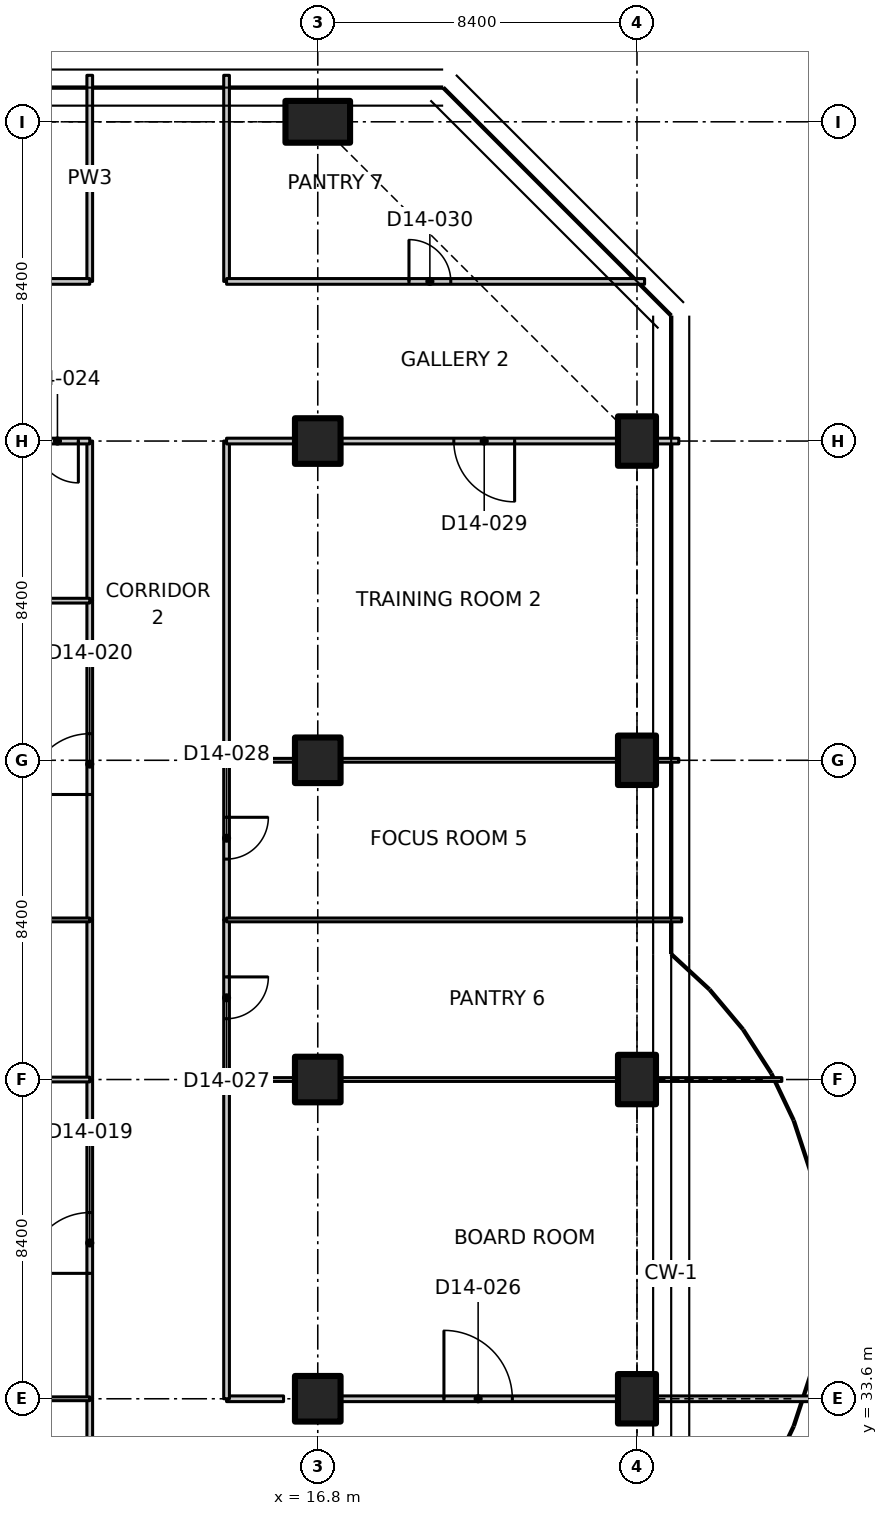
"""IFC4 building model, lengths in metres.
Left out: names, types, materials, properties, quantities, classifications, styles, units other than length and angle.
Written with IfcOpenShell. Run it as: python <this file> out.ifc"""

import sys

from ifc_helpers import new_model, si_unit, direction, frame, frame_2d, origin, origin_2d, place, context, subcontext, project, spatial, polyline, rectangle, outline, extrude, element, fill, save


model = new_model("IFC4")
c1 = context("Model", 3, precision=1e-05, world=origin(), true_north=direction((0.0, 1.0)))
c2 = subcontext(c1, "Body", "Model", "MODEL_VIEW")
j1 = project(units=[si_unit("LENGTHUNIT", "METRE"), si_unit("PLANEANGLEUNIT", "RADIAN")], contexts=[c1])
p1 = place(None, origin())
s1 = spatial("IfcSite", under=j1, at=p1, CompositionType="ELEMENT")
p2 = place(p1, origin())
s2 = spatial("IfcBuilding", under=s1, at=p2, CompositionType="ELEMENT")
p3 = place(p2, frame((0.0, 0.0, 102.5)))
s3 = spatial("IfcBuildingStorey", under=s2, at=p3, CompositionType="ELEMENT", Elevation=102.5)
for number, where, z_axis, x_axis in (
    (1, (16.8, 33.6, 0.0), (0.0, 0.0, 1.0), (1.0, 0.0, 0.0)),
    (2, (16.8, 42.0, 0.0), (0.0, 0.0, 1.0), (1.0, 0.0, 0.0)),
    (3, (16.8, 50.4, 0.0), (0.0, 0.0, 1.0), (1.0, 0.0, 0.0)),
    (4, (16.8, 58.8, 0.0), (0.0, 0.0, 1.0), (1.0, 0.0, 0.0)),
):
    element("IfcColumn", number, at=place(p3, frame(where, z_axis=z_axis, x_axis=x_axis)), inside=s3, PredefinedType="COLUMN", context=c2, shape_type="SweptSolid", body=[
        extrude(rectangle(XDim=1.2, YDim=1.2, at=origin_2d()), origin(), (0.0, 0.0, 1.0), 3.35),
    ])
p4 = place(p3, frame((16.8, 67.2, 0.0), z_axis=(0.0, 0.0, 1.0), x_axis=(0.0, 1.0, 0.0)))
e5 = element("IfcColumn", 5, at=p4, inside=s3, PredefinedType="COLUMN", context=c2, shape_type="SweptSolid", body=[
    extrude(rectangle(XDim=1.1, YDim=1.7, at=origin_2d()), origin(), (0.0, 0.0, 1.0), 3.35),
])
for number, where, z_axis, x_axis in (
    (6, (25.2, 33.6, 0.0), (0.0, 0.0, 1.0), (1.0, 0.0, 0.0)),
    (7, (25.2, 42.0, 0.0), (0.0, 0.0, 1.0), (1.0, 0.0, 0.0)),
    (8, (25.2, 50.4, 0.0), (0.0, 0.0, 1.0), (1.0, 0.0, 0.0)),
    (9, (25.2, 58.8, 0.0), (0.0, 0.0, 1.0), (1.0, 0.0, 0.0)),
):
    element("IfcColumn", number, at=place(p3, frame(where, z_axis=z_axis, x_axis=x_axis)), inside=s3, PredefinedType="COLUMN", context=c2, shape_type="SweptSolid", body=[
        extrude(rectangle(XDim=1.0, YDim=1.3, at=origin_2d()), origin(), (0.0, 0.0, 1.0), 3.35),
    ])
p5 = place(p3, frame((10.8, 25.2, 0.0), z_axis=(0.0, 0.0, 1.0), x_axis=(0.0, 1.0, 0.0)))
e10 = element("IfcWall", 10, at=p5, inside=s3, PredefinedType="PARTITIONING", context=c2, shape_type="SweptSolid", body=[
    extrude(rectangle(XDim=8.4, YDim=0.15, at=frame_2d((4.2, 0.0))), origin(), (0.0, 0.0, 1.0), 3.33),
])
p6 = place(p5, frame((3.3, 0.0, 0.0)))
e11 = element("IfcOpeningElement", 11, at=p6, cuts=e10, PredefinedType="OPENING", context=c2, shape_type="SweptSolid", body=[
    extrude(rectangle(XDim=1.6, YDim=2.1, at=frame_2d((0.8, 1.05))), frame((0.0, 0.085, 0.0), z_axis=(0.0, -1.0, 0.0), x_axis=(1.0, 0.0, 0.0)), (0.0, 0.0, 1.0), 0.17),
])
p7 = place(p3, frame((14.4, 33.6, 0.0), z_axis=(0.0, 0.0, 1.0), x_axis=(1.0, 0.0, 0.0)))
e12 = element("IfcWall", 12, at=p7, inside=s3, PredefinedType="PARTITIONING", context=c2, shape_type="SweptSolid", body=[
    extrude(rectangle(XDim=1.5, YDim=0.15, at=frame_2d((0.75, 0.0))), origin(), (0.0, 0.0, 1.0), 3.33),
])
p8 = place(p3, frame((17.42, 33.6, 0.0), z_axis=(0.0, 0.0, 1.0), x_axis=(1.0, 0.0, 0.0)))
e13 = element("IfcWall", 13, at=p8, inside=s3, PredefinedType="PARTITIONING", context=c2, shape_type="SweptSolid", body=[
    extrude(rectangle(XDim=7.26, YDim=0.15, at=frame_2d((3.63, 0.0))), origin(), (0.0, 0.0, 1.0), 3.33),
])
p9 = place(p8, frame((2.7, 0.0, 0.0)))
e14 = element("IfcOpeningElement", 14, at=p9, cuts=e13, PredefinedType="OPENING", context=c2, shape_type="SweptSolid", body=[
    extrude(rectangle(XDim=1.8, YDim=2.1, at=frame_2d((0.9, 1.05))), frame((0.0, 0.085, 0.0), z_axis=(0.0, -1.0, 0.0), x_axis=(1.0, 0.0, 0.0)), (0.0, 0.0, 1.0), 0.17),
])
p10 = place(p3, frame((25.72, 33.6, 0.0), z_axis=(0.0, 0.0, 1.0), x_axis=(1.0, 0.0, 0.0)))
e15 = element("IfcWall", 15, at=p10, inside=s3, PredefinedType="PARTITIONING", context=c2, shape_type="SweptSolid", body=[
    extrude(rectangle(XDim=4.042, YDim=0.15, at=frame_2d((2.021, 0.0))), origin(), (0.0, 0.0, 1.0), 2.98),
])
p11 = place(p3, frame((10.8, 33.6, 0.0), z_axis=(0.0, 0.0, 1.0), x_axis=(0.0, 1.0, 0.0)))
e16 = element("IfcWall", 16, at=p11, inside=s3, PredefinedType="PARTITIONING", context=c2, shape_type="SweptSolid", body=[
    extrude(rectangle(XDim=8.4, YDim=0.15, at=frame_2d((4.2, 0.0))), origin(), (0.0, 0.0, 1.0), 3.33),
])
p12 = place(p11, frame((3.3, 0.0, 0.0)))
e17 = element("IfcOpeningElement", 17, at=p12, cuts=e16, PredefinedType="OPENING", context=c2, shape_type="SweptSolid", body=[
    extrude(rectangle(XDim=1.6, YDim=2.1, at=frame_2d((0.8, 1.05))), frame((0.0, 0.085, 0.0), z_axis=(0.0, -1.0, 0.0), x_axis=(1.0, 0.0, 0.0)), (0.0, 0.0, 1.0), 0.17),
])
p13 = place(p3, frame((10.8, 46.2, 0.0), z_axis=(0.0, 0.0, 1.0), x_axis=(0.0, 1.0, 0.0)))
e18 = element("IfcWall", 18, at=p13, inside=s3, PredefinedType="PARTITIONING", context=c2, shape_type="SweptSolid", body=[
    extrude(rectangle(XDim=8.4, YDim=0.15, at=frame_2d((4.2, 0.0))), origin(), (0.0, 0.0, 1.0), 3.33),
])
p14 = place(p13, frame((3.3, 0.0, 0.0)))
e19 = element("IfcOpeningElement", 19, at=p14, cuts=e18, PredefinedType="OPENING", context=c2, shape_type="SweptSolid", body=[
    extrude(rectangle(XDim=1.6, YDim=2.1, at=frame_2d((0.8, 1.05))), frame((0.0, 0.085, 0.0), z_axis=(0.0, -1.0, 0.0), x_axis=(1.0, 0.0, 0.0)), (0.0, 0.0, 1.0), 0.17),
])
for number, where, z_axis, x_axis in (
    (20, (10.8, 42.0, 0.0), (0.0, 0.0, 1.0), (0.0, 1.0, 0.0)),
    (21, (10.8, 54.6, 0.0), (0.0, 0.0, 1.0), (0.0, 1.0, 0.0)),
):
    element("IfcWall", number, at=place(p3, frame(where, z_axis=z_axis, x_axis=x_axis)), inside=s3, PredefinedType="PARTITIONING", context=c2, shape_type="SweptSolid", body=[
        extrude(rectangle(XDim=4.2, YDim=0.15, at=frame_2d((2.1, 0.0))), origin(), (0.0, 0.0, 1.0), 3.33),
    ])
p15 = place(p3, frame((10.8, 63.0, 0.0), z_axis=(0.0, 0.0, 1.0), x_axis=(0.0, 1.0, 0.0)))
e22 = element("IfcWall", 22, at=p15, inside=s3, PredefinedType="PARTITIONING", context=c2, shape_type="SweptSolid", body=[
    extrude(outline(polyline([(0.0, 0.0), (5.423, 0.0), (5.423, 3.33), (5.28, 3.33), (4.65, 3.33), (4.648, 2.98), (3.752, 2.98), (3.75, 3.33), (0.0, 3.33), (0.0, 0.0)])), frame((0.0, 0.075, 0.0), z_axis=(0.0, -1.0, 0.0), x_axis=(1.0, 0.0, 0.0)), (0.0, 0.0, 1.0), 0.15),
])
p16 = place(p3, frame((14.4, 42.0, 0.0), z_axis=(0.0, 0.0, 1.0), x_axis=(0.0, -1.0, 0.0)))
e23 = element("IfcWall", 23, at=p16, inside=s3, PredefinedType="PARTITIONING", context=c2, shape_type="SweptSolid", body=[
    extrude(rectangle(XDim=8.4, YDim=0.15, at=frame_2d((4.2, 0.0))), origin(), (0.0, 0.0, 1.0), 3.33),
])
p17 = place(p3, frame((14.4, 46.2, 0.0), z_axis=(0.0, 0.0, 1.0), x_axis=(0.0, -1.0, 0.0)))
e24 = element("IfcWall", 24, at=p17, inside=s3, PredefinedType="PARTITIONING", context=c2, shape_type="SweptSolid", body=[
    extrude(rectangle(XDim=4.2, YDim=0.15, at=frame_2d((2.1, 0.0))), origin(), (0.0, 0.0, 1.0), 3.33),
])
p18 = place(p17, frame((1.5, 0.0, 0.0)))
e25 = element("IfcOpeningElement", 25, at=p18, cuts=e24, PredefinedType="OPENING", context=c2, shape_type="SweptSolid", body=[
    extrude(rectangle(XDim=1.1, YDim=2.1, at=frame_2d((0.55, 1.05))), frame((0.0, 0.085, 0.0), z_axis=(0.0, -1.0, 0.0), x_axis=(1.0, 0.0, 0.0)), (0.0, 0.0, 1.0), 0.17),
])
p19 = place(p3, frame((14.4, 50.4, 0.0), z_axis=(0.0, 0.0, 1.0), x_axis=(0.0, -1.0, 0.0)))
e26 = element("IfcWall", 26, at=p19, inside=s3, PredefinedType="PARTITIONING", context=c2, shape_type="SweptSolid", body=[
    extrude(rectangle(XDim=4.2, YDim=0.15, at=frame_2d((2.1, 0.0))), origin(), (0.0, 0.0, 1.0), 3.33),
])
p20 = place(p19, frame((1.5, 0.0, 0.0)))
e27 = element("IfcOpeningElement", 27, at=p20, cuts=e26, PredefinedType="OPENING", context=c2, shape_type="SweptSolid", body=[
    extrude(rectangle(XDim=1.1, YDim=2.1, at=frame_2d((0.55, 1.05))), frame((0.0, 0.085, 0.0), z_axis=(0.0, -1.0, 0.0), x_axis=(1.0, 0.0, 0.0)), (0.0, 0.0, 1.0), 0.17),
])
p21 = place(p3, frame((14.4, 58.8, 0.0), z_axis=(0.0, 0.0, 1.0), x_axis=(0.0, -1.0, 0.0)))
e28 = element("IfcWall", 28, at=p21, inside=s3, PredefinedType="PARTITIONING", context=c2, shape_type="SweptSolid", body=[
    extrude(rectangle(XDim=8.4, YDim=0.15, at=frame_2d((4.2, 0.0))), origin(), (0.0, 0.0, 1.0), 3.33),
])
p22 = place(p3, frame((14.4, 68.423, 0.0), z_axis=(0.0, 0.0, 1.0), x_axis=(0.0, -1.0, 0.0)))
e29 = element("IfcWall", 29, at=p22, inside=s3, PredefinedType="PARTITIONING", context=c2, shape_type="SweptSolid", body=[
    extrude(outline(polyline([(0.0, 0.0), (5.423, 0.0), (5.423, 3.33), (1.673, 3.33), (1.671, 2.98), (0.775, 2.98), (0.773, 3.33), (0.143, 3.33), (0.0, 3.33), (0.0, 0.0)])), frame((0.0, 0.075, 0.0), z_axis=(0.0, -1.0, 0.0), x_axis=(1.0, 0.0, 0.0)), (0.0, 0.0, 1.0), 0.15),
])
p23 = place(p3, frame((10.8, 58.8, 0.0), z_axis=(0.0, 0.0, 1.0), x_axis=(-1.0, 0.0, 0.0)))
e30 = element("IfcWall", 30, at=p23, inside=s3, PredefinedType="PARTITIONING", context=c2, shape_type="SweptSolid", body=[
    extrude(rectangle(XDim=1.78, YDim=0.15, at=frame_2d((0.89, 0.0))), origin(), (0.0, 0.0, 1.0), 3.33),
])
p24 = place(p23, frame((0.3, 0.0, 0.0)))
e31 = element("IfcOpeningElement", 31, at=p24, cuts=e30, PredefinedType="OPENING", context=c2, shape_type="SweptSolid", body=[
    extrude(rectangle(XDim=1.1, YDim=2.1, at=frame_2d((0.55, 1.05))), frame((0.0, 0.085, 0.0), z_axis=(0.0, -1.0, 0.0), x_axis=(1.0, 0.0, 0.0)), (0.0, 0.0, 1.0), 0.17),
])
p25 = place(p3, frame((-0.2, 63.0, 0.0), z_axis=(0.0, 0.0, 1.0), x_axis=(1.0, 0.0, 0.0)))
e32 = element("IfcWall", 32, at=p25, inside=s3, PredefinedType="PARTITIONING", context=c2, shape_type="SweptSolid", body=[
    extrude(outline(polyline([(0.0, 0.0), (11.0, 0.0), (11.0, 3.33), (5.091, 3.33), (5.089, 2.98), (3.711, 2.98), (3.709, 3.33), (0.0, 3.33), (0.0, 0.0)])), frame((0.0, 0.075, 0.0), z_axis=(0.0, -1.0, 0.0), x_axis=(1.0, 0.0, 0.0)), (0.0, 0.0, 1.0), 0.15),
])
p26 = place(p25, frame((5.0, 0.0, 0.0)))
e33 = element("IfcOpeningElement", 33, at=p26, cuts=e32, PredefinedType="OPENING", context=c2, shape_type="SweptSolid", body=[
    extrude(rectangle(XDim=1.1, YDim=2.1, at=frame_2d((0.55, 1.05))), frame((0.0, 0.085, 0.0), z_axis=(0.0, -1.0, 0.0), x_axis=(1.0, 0.0, 0.0)), (0.0, 0.0, 1.0), 0.17),
])
p27 = place(p3, frame((9.02, 33.6, 0.0), z_axis=(0.0, 0.0, 1.0), x_axis=(1.0, 0.0, 0.0)))
e34 = element("IfcWall", 34, at=p27, inside=s3, PredefinedType="PARTITIONING", context=c2, shape_type="SweptSolid", body=[
    extrude(rectangle(XDim=1.78, YDim=0.1, at=frame_2d((0.89, 0.0))), origin(), (0.0, 0.0, 1.0), 3.33),
])
p28 = place(p3, frame((9.02, 42.0, 0.0), z_axis=(0.0, 0.0, 1.0), x_axis=(1.0, 0.0, 0.0)))
e35 = element("IfcWall", 35, at=p28, inside=s3, PredefinedType="PARTITIONING", context=c2, shape_type="SweptSolid", body=[
    extrude(rectangle(XDim=1.78, YDim=0.125, at=frame_2d((0.89, 0.0))), origin(), (0.0, 0.0, 1.0), 3.33),
])
p29 = place(p3, frame((10.8, 46.2, 0.0), z_axis=(0.0, 0.0, 1.0), x_axis=(-1.0, 0.0, 0.0)))
e36 = element("IfcWall", 36, at=p29, inside=s3, PredefinedType="PARTITIONING", context=c2, shape_type="SweptSolid", body=[
    extrude(rectangle(XDim=6.0, YDim=0.1, at=frame_2d((3.0, 0.0))), origin(), (0.0, 0.0, 1.0), 3.33),
])
p30 = place(p29, frame((2.4, 0.0, 0.0)))
e37 = element("IfcOpeningElement", 37, at=p30, cuts=e36, PredefinedType="OPENING", context=c2, shape_type="SweptSolid", body=[
    extrude(rectangle(XDim=1.0, YDim=2.1, at=frame_2d((0.5, 1.05))), frame((0.0, 0.06, 0.0), z_axis=(0.0, -1.0, 0.0), x_axis=(1.0, 0.0, 0.0)), (0.0, 0.0, 1.0), 0.12),
])
p31 = place(p3, frame((-1.174, 54.6, 0.0), z_axis=(0.0, 0.0, 1.0), x_axis=(1.0, 0.0, 0.0)))
e38 = element("IfcWall", 38, at=p31, inside=s3, PredefinedType="PARTITIONING", context=c2, shape_type="SweptSolid", body=[
    extrude(outline(polyline([(0.0, 0.0), (11.974, 0.0), (11.974, 3.33), (1.624, 3.33), (1.622, 2.98), (0.726, 2.98), (0.724, 3.33), (0.074, 3.33), (0.0, 3.33), (0.0, 0.0)])), frame((0.0, 0.062, 0.0), z_axis=(0.0, -1.0, 0.0), x_axis=(1.0, 0.0, 0.0)), (0.0, 0.0, 1.0), 0.125),
])
p32 = place(p3, frame((26.3, 58.8, 0.0), z_axis=(0.0, 0.0, 1.0), x_axis=(-1.0, 0.0, 0.0)))
e39 = element("IfcWall", 39, at=p32, inside=s3, PredefinedType="PARTITIONING", context=c2, shape_type="SweptSolid", body=[
    extrude(rectangle(XDim=0.58, YDim=0.15, at=frame_2d((0.29, 0.0))), origin(), (0.0, 0.0, 1.0), 3.33),
])
p33 = place(p3, frame((24.68, 58.8, 0.0), z_axis=(0.0, 0.0, 1.0), x_axis=(-1.0, 0.0, 0.0)))
e40 = element("IfcWall", 40, at=p33, inside=s3, PredefinedType="PARTITIONING", context=c2, shape_type="SweptSolid", body=[
    extrude(outline(polyline([(0.0, 0.0), (7.26, 0.0), (7.26, 3.33), (0.171, 3.33), (0.169, 2.98), (0.0, 2.98), (0.0, 0.0)])), frame((0.0, 0.075, 0.0), z_axis=(0.0, -1.0, 0.0), x_axis=(1.0, 0.0, 0.0)), (0.0, 0.0, 1.0), 0.15),
])
p34 = place(p33, frame((2.7, 0.0, 0.0)))
e41 = element("IfcOpeningElement", 41, at=p34, cuts=e40, PredefinedType="OPENING", context=c2, shape_type="SweptSolid", body=[
    extrude(rectangle(XDim=1.6, YDim=2.1, at=frame_2d((0.8, 1.05))), frame((0.0, 0.085, 0.0), z_axis=(0.0, -1.0, 0.0), x_axis=(1.0, 0.0, 0.0)), (0.0, 0.0, 1.0), 0.17),
])
p35 = place(p3, frame((16.18, 58.8, 0.0), z_axis=(0.0, 0.0, 1.0), x_axis=(-1.0, 0.0, 0.0)))
e42 = element("IfcWall", 42, at=p35, inside=s3, PredefinedType="PARTITIONING", context=c2, shape_type="SweptSolid", body=[
    extrude(rectangle(XDim=1.78, YDim=0.15, at=frame_2d((0.89, 0.0))), origin(), (0.0, 0.0, 1.0), 3.33),
])
p36 = place(p3, frame((14.4, 63.0, 0.0), z_axis=(0.0, 0.0, 1.0), x_axis=(1.0, 0.0, 0.0)))
e43 = element("IfcWall", 43, at=p36, inside=s3, PredefinedType="PARTITIONING", context=c2, shape_type="SweptSolid", body=[
    extrude(outline(polyline([(0.0, 0.0), (11.0, 0.0), (11.0, 3.33), (7.291, 3.33), (7.289, 2.98), (5.911, 2.98), (5.909, 3.33), (0.0, 3.33), (0.0, 0.0)])), frame((0.0, 0.075, 0.0), z_axis=(0.0, -1.0, 0.0), x_axis=(1.0, 0.0, 0.0)), (0.0, 0.0, 1.0), 0.15),
])
p37 = place(p36, frame((4.8, 0.0, 0.0)))
e44 = element("IfcOpeningElement", 44, at=p37, cuts=e43, PredefinedType="OPENING", context=c2, shape_type="SweptSolid", body=[
    extrude(rectangle(XDim=1.1, YDim=2.1, at=frame_2d((0.55, 1.05))), frame((0.0, 0.085, 0.0), z_axis=(0.0, -1.0, 0.0), x_axis=(1.0, 0.0, 0.0)), (0.0, 0.0, 1.0), 0.17),
])
p38 = place(p3, frame((14.4, 42.0, 0.0), z_axis=(0.0, 0.0, 1.0), x_axis=(1.0, 0.0, 0.0)))
e45 = element("IfcWall", 45, at=p38, inside=s3, PredefinedType="PARTITIONING", context=c2, shape_type="SweptSolid", body=[
    extrude(rectangle(XDim=1.78, YDim=0.1, at=frame_2d((0.89, 0.0))), origin(), (0.0, 0.0, 1.0), 3.33),
])
p39 = place(p3, frame((17.42, 42.0, 0.0), z_axis=(0.0, 0.0, 1.0), x_axis=(1.0, 0.0, 0.0)))
e46 = element("IfcWall", 46, at=p39, inside=s3, PredefinedType="PARTITIONING", context=c2, shape_type="SweptSolid", body=[
    extrude(rectangle(XDim=7.26, YDim=0.1, at=frame_2d((3.63, 0.0))), origin(), (0.0, 0.0, 1.0), 3.33),
])
p40 = place(p3, frame((25.72, 42.0, 0.0), z_axis=(0.0, 0.0, 1.0), x_axis=(1.0, 0.0, 0.0)))
e47 = element("IfcWall", 47, at=p40, inside=s3, PredefinedType="PARTITIONING", context=c2, shape_type="SweptSolid", body=[
    extrude(rectangle(XDim=3.292, YDim=0.1, at=frame_2d((1.646, 0.0))), origin(), (0.0, 0.0, 1.0), 2.98),
])
p41 = place(p3, frame((14.4, 46.2, 0.0), z_axis=(0.0, 0.0, 1.0), x_axis=(1.0, 0.0, 0.0)))
e48 = element("IfcWall", 48, at=p41, inside=s3, PredefinedType="PARTITIONING", context=c2, shape_type="SweptSolid", body=[
    extrude(outline(polyline([(0.0, 0.0), (11.974, 0.0), (11.974, 3.33), (11.9, 3.33), (11.25, 3.33), (11.248, 2.98), (10.352, 2.98), (10.35, 3.33), (0.0, 3.33), (0.0, 0.0)])), frame((0.0, 0.05, 0.0), z_axis=(0.0, -1.0, 0.0), x_axis=(1.0, 0.0, 0.0)), (0.0, 0.0, 1.0), 0.1),
])
p42 = place(p3, frame((14.4, 50.4, 0.0), z_axis=(0.0, 0.0, 1.0), x_axis=(1.0, 0.0, 0.0)))
e49 = element("IfcWall", 49, at=p42, inside=s3, PredefinedType="PARTITIONING", context=c2, shape_type="SweptSolid", body=[
    extrude(rectangle(XDim=1.78, YDim=0.1, at=frame_2d((0.89, 0.0))), origin(), (0.0, 0.0, 1.0), 3.33),
])
p43 = place(p3, frame((17.42, 50.4, 0.0), z_axis=(0.0, 0.0, 1.0), x_axis=(1.0, 0.0, 0.0)))
e50 = element("IfcWall", 50, at=p43, inside=s3, PredefinedType="PARTITIONING", context=c2, shape_type="SweptSolid", body=[
    extrude(rectangle(XDim=7.26, YDim=0.1, at=frame_2d((3.63, 0.0))), origin(), (0.0, 0.0, 1.0), 3.33),
])
p44 = place(p3, frame((25.72, 50.4, 0.0), z_axis=(0.0, 0.0, 1.0), x_axis=(1.0, 0.0, 0.0)))
e51 = element("IfcWall", 51, at=p44, inside=s3, PredefinedType="PARTITIONING", context=c2, shape_type="SweptSolid", body=[
    extrude(rectangle(XDim=0.58, YDim=0.1, at=frame_2d((0.29, 0.0))), origin(), (0.0, 0.0, 1.0), 3.33),
])
p45 = place(p12, origin())
e52 = element("IfcDoor", 52, at=p45, inside=s3, OperationType="DOUBLE_DOOR_SINGLE_SWING", PredefinedType="DOOR", context=c2, shape_type="SweptSolid", body=[
    extrude(rectangle(XDim=1.6, YDim=2.1, at=frame_2d((0.8, 1.05))), frame((0.0, 0.025, 0.0), z_axis=(0.0, -1.0, 0.0), x_axis=(1.0, 0.0, 0.0)), (0.0, 0.0, 1.0), 0.05),
])
fill(e17, e52)
p46 = place(p14, origin())
e53 = element("IfcDoor", 53, at=p46, inside=s3, OperationType="DOUBLE_DOOR_SINGLE_SWING", PredefinedType="DOOR", context=c2, shape_type="SweptSolid", body=[
    extrude(rectangle(XDim=1.6, YDim=2.1, at=frame_2d((0.8, 1.05))), frame((0.0, 0.025, 0.0), z_axis=(0.0, -1.0, 0.0), x_axis=(1.0, 0.0, 0.0)), (0.0, 0.0, 1.0), 0.05),
])
fill(e19, e53)
p47 = place(p24, origin())
e54 = element("IfcDoor", 54, at=p47, inside=s3, OperationType="SINGLE_SWING_LEFT", PredefinedType="DOOR", context=c2, shape_type="SweptSolid", body=[
    extrude(rectangle(XDim=1.1, YDim=2.1, at=frame_2d((0.55, 1.05))), frame((0.0, 0.025, 0.0), z_axis=(0.0, -1.0, 0.0), x_axis=(1.0, 0.0, 0.0)), (0.0, 0.0, 1.0), 0.05),
])
fill(e31, e54)
p48 = place(p9, origin())
e55 = element("IfcDoor", 55, at=p48, inside=s3, OperationType="DOUBLE_DOOR_SINGLE_SWING", PredefinedType="DOOR", context=c2, shape_type="SweptSolid", body=[
    extrude(rectangle(XDim=1.8, YDim=2.1, at=frame_2d((0.9, 1.05))), frame((0.0, 0.025, 0.0), z_axis=(0.0, -1.0, 0.0), x_axis=(1.0, 0.0, 0.0)), (0.0, 0.0, 1.0), 0.05),
])
fill(e14, e55)
p49 = place(p18, origin())
e56 = element("IfcDoor", 56, at=p49, inside=s3, OperationType="SINGLE_SWING_LEFT", PredefinedType="DOOR", context=c2, shape_type="SweptSolid", body=[
    extrude(rectangle(XDim=1.1, YDim=2.1, at=frame_2d((0.55, 1.05))), frame((0.0, 0.025, 0.0), z_axis=(0.0, -1.0, 0.0), x_axis=(1.0, 0.0, 0.0)), (0.0, 0.0, 1.0), 0.05),
])
fill(e25, e56)
p50 = place(p20, origin())
e57 = element("IfcDoor", 57, at=p50, inside=s3, OperationType="SINGLE_SWING_LEFT", PredefinedType="DOOR", context=c2, shape_type="SweptSolid", body=[
    extrude(rectangle(XDim=1.1, YDim=2.1, at=frame_2d((0.55, 1.05))), frame((0.0, 0.025, 0.0), z_axis=(0.0, -1.0, 0.0), x_axis=(1.0, 0.0, 0.0)), (0.0, 0.0, 1.0), 0.05),
])
fill(e27, e57)
p51 = place(p34, origin())
e58 = element("IfcDoor", 58, at=p51, inside=s3, OperationType="DOUBLE_DOOR_SINGLE_SWING", PredefinedType="DOOR", context=c2, shape_type="SweptSolid", body=[
    extrude(rectangle(XDim=1.6, YDim=2.1, at=frame_2d((0.8, 1.05))), frame((0.0, 0.025, 0.0), z_axis=(0.0, -1.0, 0.0), x_axis=(1.0, 0.0, 0.0)), (0.0, 0.0, 1.0), 0.05),
])
fill(e41, e58)
p52 = place(p37, origin())
e59 = element("IfcDoor", 59, at=p52, inside=s3, OperationType="SINGLE_SWING_LEFT", PredefinedType="DOOR", context=c2, shape_type="SweptSolid", body=[
    extrude(rectangle(XDim=1.1, YDim=2.1, at=frame_2d((0.55, 1.05))), frame((0.0, 0.025, 0.0), z_axis=(0.0, -1.0, 0.0), x_axis=(1.0, 0.0, 0.0)), (0.0, 0.0, 1.0), 0.05),
])
fill(e44, e59)
save(model, sys.argv[1])
